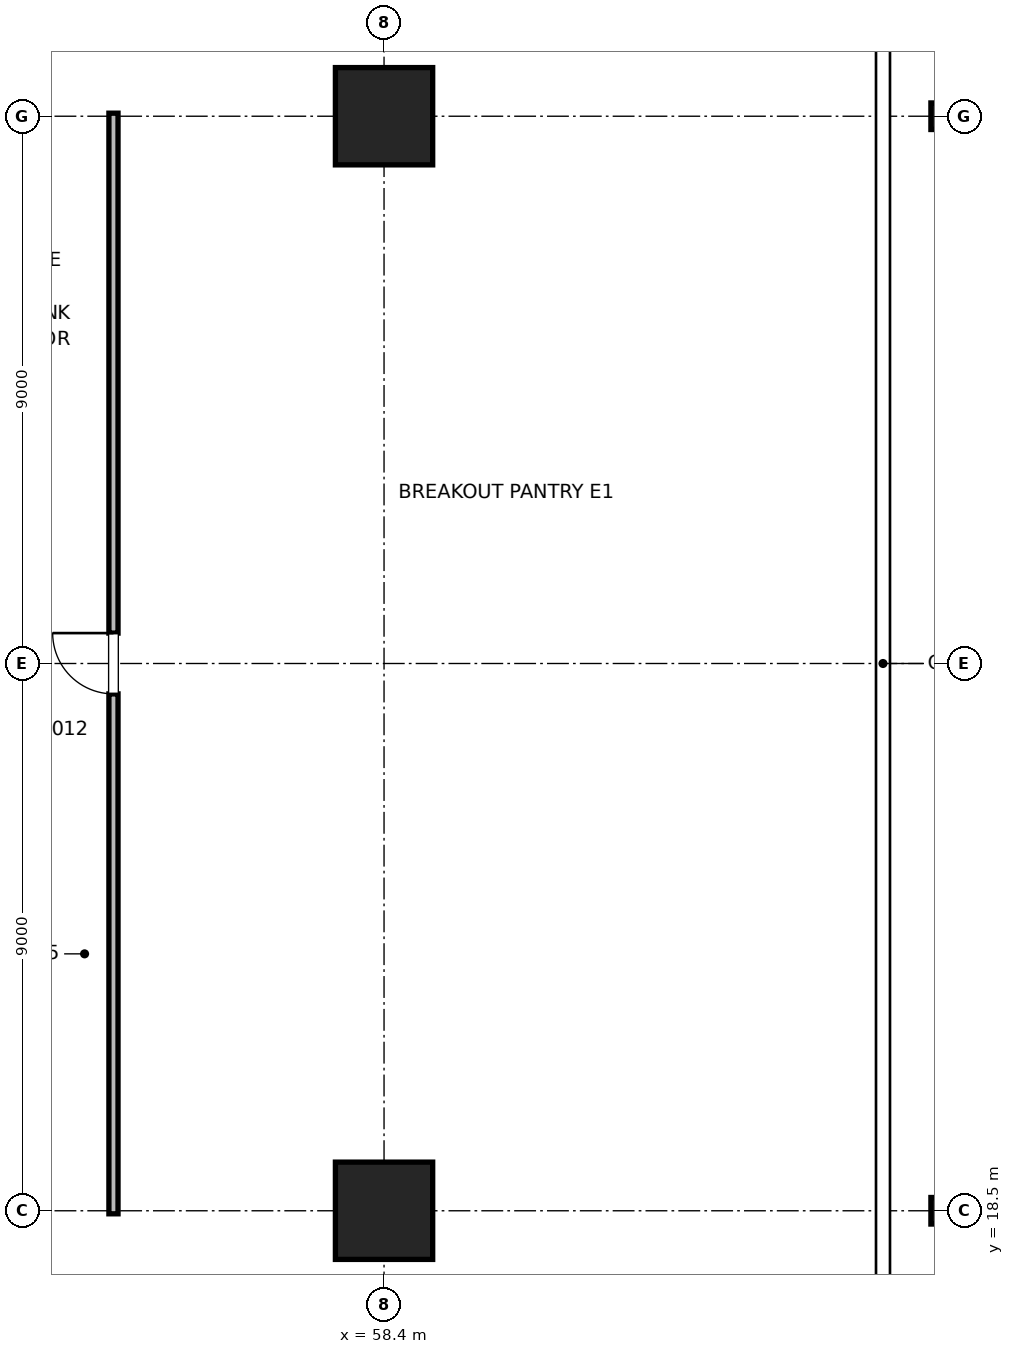
"""IFC4 building model, lengths in metres.
Left out: names, types, materials, properties, quantities, classifications, styles, units other than length and angle.
Written with IfcOpenShell. Run it as: python <this file> out.ifc"""

import sys

from ifc_helpers import new_model, si_unit, direction, frame, frame_2d, origin, origin_2d, place, context, subcontext, project, spatial, rectangle, i_section, extrude, element, fill, save


model = new_model("IFC4")
c1 = context("Model", 3, precision=1e-05, world=origin(), true_north=direction((0.0, 1.0)))
c2 = subcontext(c1, "Body", "Model", "MODEL_VIEW")
j1 = project(units=[si_unit("LENGTHUNIT", "METRE"), si_unit("PLANEANGLEUNIT", "RADIAN")], contexts=[c1])
p1 = place(None, origin())
s1 = spatial("IfcSite", under=j1, at=p1, CompositionType="ELEMENT")
p2 = place(p1, origin())
s2 = spatial("IfcBuilding", under=s1, at=p2, CompositionType="ELEMENT")
p3 = place(p2, frame((0.0, 0.0, 152.4)))
s3 = spatial("IfcBuildingStorey", under=s2, at=p3, CompositionType="ELEMENT", Elevation=152.4)
for number, where, z_axis, x_axis in (
    (1, (58.4, 18.5, 0.0), (0.0, 0.0, 1.0), (1.0, 0.0, 0.0)),
    (2, (58.4, 36.5, 0.0), (0.0, 0.0, 1.0), (1.0, 0.0, 0.0)),
):
    element("IfcColumn", number, at=place(p3, frame(where, z_axis=z_axis, x_axis=x_axis)), inside=s3, PredefinedType="COLUMN", context=c2, shape_type="SweptSolid", body=[
        extrude(rectangle(XDim=1.6, YDim=1.6, at=origin_2d()), origin(), (0.0, 0.0, 1.0), 4.0),
    ])
for number, where, z_axis, x_axis in (
    (3, (67.6, 18.5, 0.0), (0.0, 0.0, 1.0), (1.0, 0.0, 0.0)),
    (4, (67.6, 36.5, 0.0), (0.0, 0.0, 1.0), (1.0, 0.0, 0.0)),
):
    element("IfcColumn", number, at=place(p3, frame(where, z_axis=z_axis, x_axis=x_axis)), inside=s3, PredefinedType="COLUMN", context=c2, shape_type="SweptSolid", body=[
        extrude(i_section(OverallWidth=0.412, OverallDepth=0.437, WebThickness=0.036, FlangeThickness=0.058, FilletRadius=0.015, at=origin_2d()), origin(), (0.0, 0.0, 1.0), 4.0),
    ])
p4 = place(p3, frame((53.95, 18.45, 0.0), z_axis=(0.0, 0.0, 1.0), x_axis=(0.0, 1.0, 0.0)))
e5 = element("IfcWall", 5, at=p4, inside=s3, PredefinedType="PARTITIONING", context=c2, shape_type="SweptSolid", body=[
    extrude(rectangle(XDim=18.1, YDim=0.15, at=frame_2d((9.05, 0.0))), origin(), (0.0, 0.0, 1.0), 2.85),
])
p5 = place(p4, frame((8.55, 0.0, 0.0)))
e6 = element("IfcOpeningElement", 6, at=p5, cuts=e5, PredefinedType="OPENING", context=c2, shape_type="SweptSolid", body=[
    extrude(rectangle(XDim=1.0, YDim=2.15, at=frame_2d((0.5, 1.075))), frame((0.0, 0.075, 0.0), z_axis=(0.0, -1.0, 0.0), x_axis=(1.0, 0.0, 0.0)), (0.0, 0.0, 1.0), 0.15),
])
p6 = place(p5, origin())
e7 = element("IfcDoor", 7, at=p6, inside=s3, OperationType="SINGLE_SWING_RIGHT", PredefinedType="DOOR", context=c2, shape_type="SweptSolid", body=[
    extrude(rectangle(XDim=1.0, YDim=2.15, at=frame_2d((0.5, 1.075))), frame((0.0, 0.025, 0.0), z_axis=(0.0, -1.0, 0.0), x_axis=(1.0, 0.0, 0.0)), (0.0, 0.0, 1.0), 0.05),
])
fill(e6, e7)
save(model, sys.argv[1])
